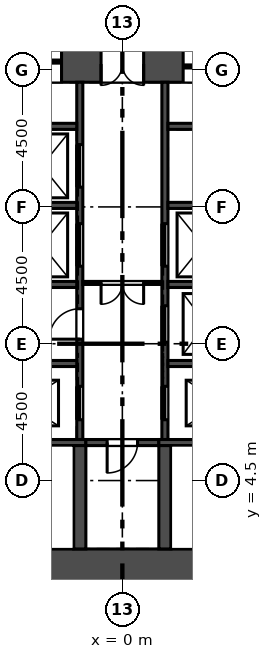
"""IFC4 building model, lengths in metres.
Left out: names, types, materials, properties, quantities, classifications, styles, units other than length and angle.
Written with IfcOpenShell. Run it as: python <this file> out.ifc"""

import sys

from ifc_helpers import new_model, si_unit, direction, frame, frame_2d, origin, place, context, subcontext, project, spatial, rectangle, extrude, element, fill, save


model = new_model("IFC4")
c1 = context("Model", 3, precision=1e-05, world=origin(), true_north=direction((0.0, 1.0)))
c2 = subcontext(c1, "Body", "Model", "MODEL_VIEW")
j1 = project(units=[si_unit("LENGTHUNIT", "METRE"), si_unit("PLANEANGLEUNIT", "RADIAN")], contexts=[c1])
p1 = place(None, origin())
s1 = spatial("IfcSite", under=j1, at=p1, CompositionType="ELEMENT")
p2 = place(p1, origin())
s2 = spatial("IfcBuilding", under=s1, at=p2, CompositionType="ELEMENT")
p3 = place(p2, frame((0.0, 0.0, 137.5)))
s3 = spatial("IfcBuildingStorey", under=s2, at=p3, CompositionType="ELEMENT", Elevation=137.5)
p4 = place(p3, frame((-13.8, 1.65, 0.0), z_axis=(0.0, 0.0, 1.0), x_axis=(1.0, 0.0, 0.0)))
e1 = element("IfcWall", 1, at=p4, inside=s3, PredefinedType="SHEAR", context=c2, shape_type="SweptSolid", body=[
    extrude(rectangle(XDim=27.6, YDim=1.2, at=frame_2d((13.8, 0.0))), origin(), (0.0, 0.0, 1.0), 5.4),
])
p5 = place(p3, frame((9.296, 18.2, 0.0), z_axis=(0.0, 0.0, 1.0), x_axis=(-1.0, 0.0, 0.0)))
e2 = element("IfcWall", 2, at=p5, inside=s3, PredefinedType="SHEAR", context=c2, shape_type="SweptSolid", body=[
    extrude(rectangle(XDim=18.592, YDim=1.2, at=frame_2d((9.296, 0.0))), origin(), (0.0, 0.0, 1.0), 5.4),
])
p6 = place(p5, frame((8.596, 0.0, 0.0)))
e3 = element("IfcOpeningElement", 3, at=p6, cuts=e2, PredefinedType="OPENING", context=c2, shape_type="SweptSolid", body=[
    extrude(rectangle(XDim=1.4, YDim=2.1, at=frame_2d((0.7, 1.05))), frame((0.0, 0.61, 0.0), z_axis=(0.0, -1.0, 0.0), x_axis=(1.0, 0.0, 0.0)), (0.0, 0.0, 1.0), 1.22),
])
p7 = place(p5, frame((11.296, 0.0, 0.0)))
e4 = element("IfcOpeningElement", 4, at=p7, cuts=e2, PredefinedType="OPENING", context=c2, shape_type="SweptSolid", body=[
    extrude(rectangle(XDim=6.0, YDim=2.4, at=frame_2d((3.0, 1.2))), frame((0.0, 0.61, 0.0), z_axis=(0.0, -1.0, 0.0), x_axis=(1.0, 0.0, 0.0)), (0.0, 0.0, 1.0), 1.22),
])
p8 = place(p5, frame((1.296, 0.0, 0.0)))
e5 = element("IfcOpeningElement", 5, at=p8, cuts=e2, PredefinedType="OPENING", context=c2, shape_type="SweptSolid", body=[
    extrude(rectangle(XDim=6.0, YDim=2.4, at=frame_2d((3.0, 1.2))), frame((0.0, 0.61, 0.0), z_axis=(0.0, -1.0, 0.0), x_axis=(1.0, 0.0, 0.0)), (0.0, 0.0, 1.0), 1.22),
])
p9 = place(p3, frame((-1.4, 5.85, -0.4), z_axis=(0.0, 0.0, 1.0), x_axis=(0.0, 1.0, 0.0)))
e6 = element("IfcWall", 6, at=p9, inside=s3, PredefinedType="SOLIDWALL", context=c2, shape_type="SweptSolid", body=[
    extrude(rectangle(XDim=11.75, YDim=0.2, at=frame_2d((5.875, 0.0))), origin(), (0.0, 0.0, 1.0), 5.4),
])
p10 = place(p9, frame((5.7, 0.0, 0.4)))
e7 = element("IfcOpeningElement", 7, at=p10, cuts=e6, PredefinedType="OPENING", context=c2, shape_type="SweptSolid", body=[
    extrude(rectangle(XDim=1.4, YDim=2.1, at=frame_2d((0.7, 1.05))), frame((0.0, 0.11, 0.0), z_axis=(0.0, -1.0, 0.0), x_axis=(1.0, 0.0, 0.0)), (0.0, 0.0, 1.0), 0.22),
])
p11 = place(p9, frame((8.3, 0.0, 0.4)))
e8 = element("IfcOpeningElement", 8, at=p11, cuts=e6, PredefinedType="OPENING", context=c2, shape_type="SweptSolid", body=[
    extrude(rectangle(XDim=1.4, YDim=2.1, at=frame_2d((0.7, 1.05))), frame((0.0, 0.11, 0.0), z_axis=(0.0, -1.0, 0.0), x_axis=(1.0, 0.0, 0.0)), (0.0, 0.0, 1.0), 0.22),
])
p12 = place(p9, frame((0.65, 0.0, 0.4)))
e9 = element("IfcOpeningElement", 9, at=p12, cuts=e6, PredefinedType="OPENING", context=c2, shape_type="SweptSolid", body=[
    extrude(rectangle(XDim=1.1, YDim=2.1, at=frame_2d((0.55, 1.05))), frame((0.0, 0.11, 0.0), z_axis=(0.0, -1.0, 0.0), x_axis=(1.0, 0.0, 0.0)), (0.0, 0.0, 1.0), 0.22),
])
p13 = place(p9, frame((3.3, 0.0, 0.4)))
e10 = element("IfcOpeningElement", 10, at=p13, cuts=e6, PredefinedType="OPENING", context=c2, shape_type="SweptSolid", body=[
    extrude(rectangle(XDim=1.0, YDim=2.1, at=frame_2d((0.5, 1.05))), frame((0.0, 0.11, 0.0), z_axis=(0.0, -1.0, 0.0), x_axis=(1.0, 0.0, 0.0)), (0.0, 0.0, 1.0), 0.22),
])
p14 = place(p3, frame((1.4, 5.85, -0.4), z_axis=(0.0, 0.0, 1.0), x_axis=(0.0, 1.0, 0.0)))
e11 = element("IfcWall", 11, at=p14, inside=s3, PredefinedType="SOLIDWALL", context=c2, shape_type="SweptSolid", body=[
    extrude(rectangle(XDim=11.75, YDim=0.2, at=frame_2d((5.875, 0.0))), origin(), (0.0, 0.0, 1.0), 5.4),
])
p15 = place(p14, frame((3.2, 0.0, 0.4)))
e12 = element("IfcOpeningElement", 12, at=p15, cuts=e11, PredefinedType="OPENING", context=c2, shape_type="SweptSolid", body=[
    extrude(rectangle(XDim=1.2, YDim=2.1, at=frame_2d((0.6, 1.05))), frame((0.0, 0.11, 0.0), z_axis=(0.0, -1.0, 0.0), x_axis=(1.0, 0.0, 0.0)), (0.0, 0.0, 1.0), 0.22),
])
p16 = place(p14, frame((5.7, 0.0, 0.4)))
e13 = element("IfcOpeningElement", 13, at=p16, cuts=e11, PredefinedType="OPENING", context=c2, shape_type="SweptSolid", body=[
    extrude(rectangle(XDim=1.4, YDim=2.1, at=frame_2d((0.7, 1.05))), frame((0.0, 0.11, 0.0), z_axis=(0.0, -1.0, 0.0), x_axis=(1.0, 0.0, 0.0)), (0.0, 0.0, 1.0), 0.22),
])
p17 = place(p14, frame((0.65, 0.0, 0.4)))
e14 = element("IfcOpeningElement", 14, at=p17, cuts=e11, PredefinedType="OPENING", context=c2, shape_type="SweptSolid", body=[
    extrude(rectangle(XDim=1.1, YDim=2.1, at=frame_2d((0.55, 1.05))), frame((0.0, 0.11, 0.0), z_axis=(0.0, -1.0, 0.0), x_axis=(1.0, 0.0, 0.0)), (0.0, 0.0, 1.0), 0.22),
])
for number, where, z_axis, x_axis in (
    (15, (-5.7, 8.35, -0.4), (0.0, 0.0, 1.0), (1.0, 0.0, 0.0)),
    (16, (1.5, 8.35, -0.4), (0.0, 0.0, 1.0), (1.0, 0.0, 0.0)),
):
    element("IfcWall", number, at=place(p3, frame(where, z_axis=z_axis, x_axis=x_axis)), inside=s3, PredefinedType="SOLIDWALL", context=c2, shape_type="SweptSolid", body=[
        extrude(rectangle(XDim=4.2, YDim=0.2, at=frame_2d((2.1, 0.0))), origin(), (0.0, 0.0, 1.0), 5.4),
    ])
p18 = place(p3, frame((-12.6, 5.75, -0.4), z_axis=(0.0, 0.0, 1.0), x_axis=(1.0, 0.0, 0.0)))
e17 = element("IfcWall", 17, at=p18, inside=s3, PredefinedType="SOLIDWALL", context=c2, shape_type="SweptSolid", body=[
    extrude(rectangle(XDim=11.4, YDim=0.2, at=frame_2d((5.7, 0.0))), origin(), (0.0, 0.0, 1.0), 5.4),
])
p19 = place(p3, frame((-1.2, 5.75, -0.4), z_axis=(0.0, 0.0, 1.0), x_axis=(1.0, 0.0, 0.0)))
e18 = element("IfcWall", 18, at=p19, inside=s3, PredefinedType="SOLIDWALL", context=c2, shape_type="SweptSolid", body=[
    extrude(rectangle(XDim=2.4, YDim=0.2, at=frame_2d((1.2, 0.0))), origin(), (0.0, 0.0, 1.0), 5.4),
])
p20 = place(p19, frame((0.7, 0.0, 0.4)))
e19 = element("IfcOpeningElement", 19, at=p20, cuts=e18, PredefinedType="OPENING", context=c2, shape_type="SweptSolid", body=[
    extrude(rectangle(XDim=1.0, YDim=2.1, at=frame_2d((0.5, 1.05))), frame((0.0, 0.11, 0.0), z_axis=(0.0, -1.0, 0.0), x_axis=(1.0, 0.0, 0.0)), (0.0, 0.0, 1.0), 0.22),
])
p21 = place(p3, frame((1.2, 5.75, -0.4), z_axis=(0.0, 0.0, 1.0), x_axis=(1.0, 0.0, 0.0)))
e20 = element("IfcWall", 20, at=p21, inside=s3, PredefinedType="SOLIDWALL", context=c2, shape_type="SweptSolid", body=[
    extrude(rectangle(XDim=11.4, YDim=0.2, at=frame_2d((5.7, 0.0))), origin(), (0.0, 0.0, 1.0), 5.4),
])
for number, where, z_axis, x_axis in (
    (21, (-1.4, 2.25, -0.4), (0.0, 0.0, 1.0), (0.0, 1.0, 0.0)),
    (22, (1.4, 2.25, -0.4), (0.0, 0.0, 1.0), (0.0, 1.0, 0.0)),
):
    element("IfcWall", number, at=place(p3, frame(where, z_axis=z_axis, x_axis=x_axis)), inside=s3, PredefinedType="SOLIDWALL", context=c2, shape_type="SweptSolid", body=[
        extrude(rectangle(XDim=3.4, YDim=0.4, at=frame_2d((1.7, 0.0))), origin(), (0.0, 0.0, 1.0), 5.4),
    ])
for number, where, z_axis, x_axis in (
    (23, (-3.5, 10.95, -0.4), (0.0, 0.0, 1.0), (1.0, 0.0, 0.0)),
    (24, (-3.5, 13.55, -0.4), (0.0, 0.0, 1.0), (1.0, 0.0, 0.0)),
    (25, (-3.5, 16.15, -0.4), (0.0, 0.0, 1.0), (1.0, 0.0, 0.0)),
    (26, (1.5, 10.95, -0.4), (0.0, 0.0, 1.0), (1.0, 0.0, 0.0)),
    (27, (1.5, 13.55, -0.4), (0.0, 0.0, 1.0), (1.0, 0.0, 0.0)),
    (28, (1.5, 16.15, -0.4), (0.0, 0.0, 1.0), (1.0, 0.0, 0.0)),
):
    element("IfcWall", number, at=place(p3, frame(where, z_axis=z_axis, x_axis=x_axis)), inside=s3, PredefinedType="SOLIDWALL", context=c2, shape_type="SweptSolid", body=[
        extrude(rectangle(XDim=2.0, YDim=0.2, at=frame_2d((1.0, 0.0))), origin(), (0.0, 0.0, 1.0), 5.4),
    ])
p22 = place(p3, frame((-1.3, 11.0, 0.0), z_axis=(0.0, 0.0, 1.0), x_axis=(1.0, 0.0, 0.0)))
e29 = element("IfcWall", 29, at=p22, inside=s3, PredefinedType="PARTITIONING", context=c2, shape_type="SweptSolid", body=[
    extrude(rectangle(XDim=2.6, YDim=0.1, at=frame_2d((1.3, 0.0))), origin(), (0.0, 0.0, 1.0), 5.0),
])
p23 = place(p22, frame((0.6, 0.0, 0.0)))
e30 = element("IfcOpeningElement", 30, at=p23, cuts=e29, PredefinedType="OPENING", context=c2, shape_type="SweptSolid", body=[
    extrude(rectangle(XDim=1.4, YDim=2.1, at=frame_2d((0.7, 1.05))), frame((0.0, 0.06, 0.0), z_axis=(0.0, -1.0, 0.0), x_axis=(1.0, 0.0, 0.0)), (0.0, 0.0, 1.0), 0.12),
])
p24 = place(p10, origin())
e31 = element("IfcDoor", 31, at=p24, inside=s3, OperationType="SLIDING_TO_LEFT", PredefinedType="DOOR", context=c2, shape_type="SweptSolid", body=[
    extrude(rectangle(XDim=1.4, YDim=2.1, at=frame_2d((0.7, 1.05))), frame((0.0, 0.025, 0.0), z_axis=(0.0, -1.0, 0.0), x_axis=(1.0, 0.0, 0.0)), (0.0, 0.0, 1.0), 0.05),
])
fill(e7, e31)
p25 = place(p11, origin())
e32 = element("IfcDoor", 32, at=p25, inside=s3, OperationType="SLIDING_TO_LEFT", PredefinedType="DOOR", context=c2, shape_type="SweptSolid", body=[
    extrude(rectangle(XDim=1.4, YDim=2.1, at=frame_2d((0.7, 1.05))), frame((0.0, 0.025, 0.0), z_axis=(0.0, -1.0, 0.0), x_axis=(1.0, 0.0, 0.0)), (0.0, 0.0, 1.0), 0.05),
])
fill(e8, e32)
p26 = place(p12, origin())
e33 = element("IfcDoor", 33, at=p26, inside=s3, OperationType="SLIDING_TO_RIGHT", PredefinedType="DOOR", context=c2, shape_type="SweptSolid", body=[
    extrude(rectangle(XDim=1.1, YDim=2.1, at=frame_2d((0.55, 1.05))), frame((0.0, 0.025, 0.0), z_axis=(0.0, -1.0, 0.0), x_axis=(1.0, 0.0, 0.0)), (0.0, 0.0, 1.0), 0.05),
])
fill(e9, e33)
p27 = place(p15, origin())
e34 = element("IfcDoor", 34, at=p27, inside=s3, OperationType="SLIDING_TO_LEFT", PredefinedType="DOOR", context=c2, shape_type="SweptSolid", body=[
    extrude(rectangle(XDim=1.2, YDim=2.1, at=frame_2d((0.6, 1.05))), frame((0.0, 0.025, 0.0), z_axis=(0.0, -1.0, 0.0), x_axis=(1.0, 0.0, 0.0)), (0.0, 0.0, 1.0), 0.05),
])
fill(e12, e34)
p28 = place(p16, origin())
e35 = element("IfcDoor", 35, at=p28, inside=s3, OperationType="SLIDING_TO_LEFT", PredefinedType="DOOR", context=c2, shape_type="SweptSolid", body=[
    extrude(rectangle(XDim=1.4, YDim=2.1, at=frame_2d((0.7, 1.05))), frame((0.0, 0.025, 0.0), z_axis=(0.0, -1.0, 0.0), x_axis=(1.0, 0.0, 0.0)), (0.0, 0.0, 1.0), 0.05),
])
fill(e13, e35)
p29 = place(p17, origin())
e36 = element("IfcDoor", 36, at=p29, inside=s3, OperationType="SLIDING_TO_RIGHT", PredefinedType="DOOR", context=c2, shape_type="SweptSolid", body=[
    extrude(rectangle(XDim=1.1, YDim=2.1, at=frame_2d((0.55, 1.05))), frame((0.0, 0.025, 0.0), z_axis=(0.0, -1.0, 0.0), x_axis=(1.0, 0.0, 0.0)), (0.0, 0.0, 1.0), 0.05),
])
fill(e14, e36)
p30 = place(p13, origin())
e37 = element("IfcDoor", 37, at=p30, inside=s3, OperationType="SINGLE_SWING_LEFT", PredefinedType="DOOR", context=c2, shape_type="SweptSolid", body=[
    extrude(rectangle(XDim=1.0, YDim=2.1, at=frame_2d((0.5, 1.05))), frame((0.0, 0.025, 0.0), z_axis=(0.0, -1.0, 0.0), x_axis=(1.0, 0.0, 0.0)), (0.0, 0.0, 1.0), 0.05),
])
fill(e10, e37)
p31 = place(p20, frame((1.0, 0.0, 0.0), z_axis=(0.0, 0.0, 1.0), x_axis=(-1.0, 0.0, 0.0)))
e38 = element("IfcDoor", 38, at=p31, inside=s3, OperationType="SINGLE_SWING_RIGHT", PredefinedType="DOOR", context=c2, shape_type="SweptSolid", body=[
    extrude(rectangle(XDim=1.0, YDim=2.1, at=frame_2d((0.5, 1.05))), frame((0.0, 0.025, 0.0), z_axis=(0.0, -1.0, 0.0), x_axis=(1.0, 0.0, 0.0)), (0.0, 0.0, 1.0), 0.05),
])
fill(e19, e38)
p32 = place(p23, frame((1.4, 0.0, 0.0), z_axis=(0.0, 0.0, 1.0), x_axis=(-1.0, 0.0, 0.0)))
e39 = element("IfcDoor", 39, at=p32, inside=s3, OperationType="DOUBLE_DOOR_SINGLE_SWING", PredefinedType="DOOR", context=c2, shape_type="SweptSolid", body=[
    extrude(rectangle(XDim=1.4, YDim=2.1, at=frame_2d((0.7, 1.05))), frame((0.0, 0.025, 0.0), z_axis=(0.0, -1.0, 0.0), x_axis=(1.0, 0.0, 0.0)), (0.0, 0.0, 1.0), 0.05),
])
fill(e30, e39)
p33 = place(p6, origin())
e40 = element("IfcDoor", 40, at=p33, inside=s3, OperationType="DOUBLE_DOOR_SINGLE_SWING", PredefinedType="DOOR", context=c2, shape_type="SweptSolid", body=[
    extrude(rectangle(XDim=1.4, YDim=2.1, at=frame_2d((0.7, 1.05))), frame((0.0, 0.025, 0.0), z_axis=(0.0, -1.0, 0.0), x_axis=(1.0, 0.0, 0.0)), (0.0, 0.0, 1.0), 0.05),
])
fill(e3, e40)
p34 = place(p7, origin())
e41 = element("IfcDoor", 41, at=p34, inside=s3, OperationType="DOUBLE_DOOR_SLIDING", PredefinedType="DOOR", context=c2, shape_type="SweptSolid", body=[
    extrude(rectangle(XDim=6.0, YDim=2.4, at=frame_2d((3.0, 1.2))), frame((0.0, 0.025, 0.0), z_axis=(0.0, -1.0, 0.0), x_axis=(1.0, 0.0, 0.0)), (0.0, 0.0, 1.0), 0.05),
])
fill(e4, e41)
p35 = place(p8, origin())
e42 = element("IfcDoor", 42, at=p35, inside=s3, OperationType="DOUBLE_DOOR_SLIDING", PredefinedType="DOOR", context=c2, shape_type="SweptSolid", body=[
    extrude(rectangle(XDim=6.0, YDim=2.4, at=frame_2d((3.0, 1.2))), frame((0.0, 0.025, 0.0), z_axis=(0.0, -1.0, 0.0), x_axis=(1.0, 0.0, 0.0)), (0.0, 0.0, 1.0), 0.05),
])
fill(e5, e42)
save(model, sys.argv[1])
